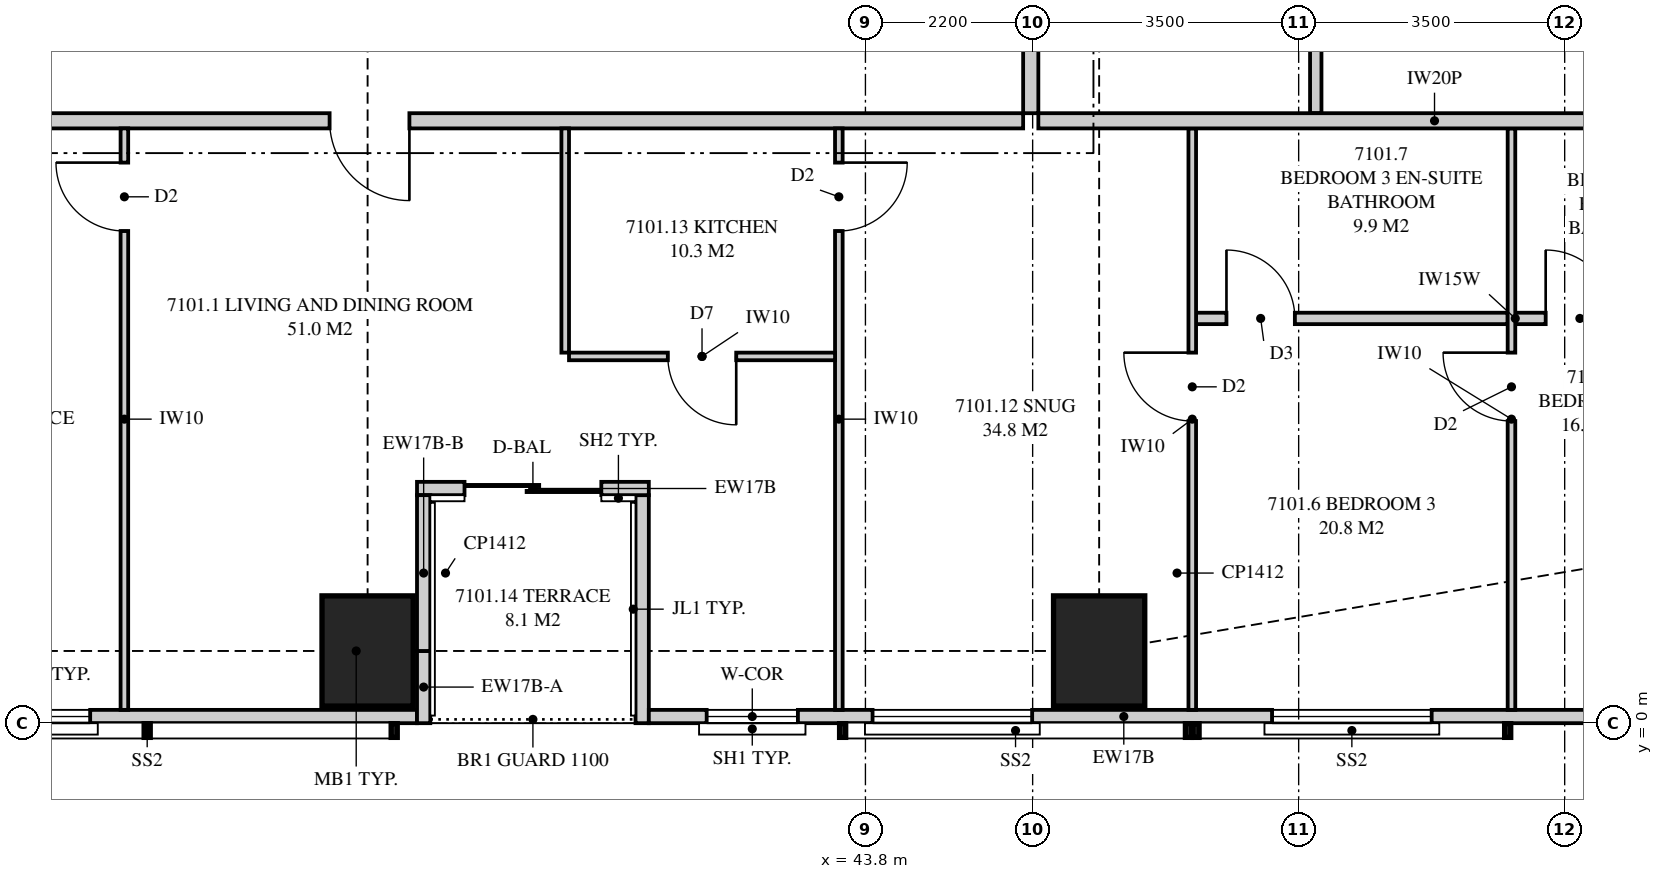
"""IFC4 building model, lengths in metres.
Left out: names, types, materials, properties, quantities, classifications, styles, units other than length and angle.
Written with IfcOpenShell. Run it as: python <this file> out.ifc"""

import sys

from ifc_helpers import new_model, si_unit, direction, frame, frame_2d, origin, origin_2d, place, context, subcontext, project, spatial, polyline, rectangle, outline, extrude, element, fill, save


model = new_model("IFC4")
c1 = context("Model", 3, precision=1e-05, world=origin(), true_north=direction((0.0, 1.0)))
c2 = subcontext(c1, "Body", "Model", "MODEL_VIEW")
j1 = project(units=[si_unit("LENGTHUNIT", "METRE"), si_unit("PLANEANGLEUNIT", "RADIAN")], contexts=[c1])
p1 = place(None, origin())
s1 = spatial("IfcSite", under=j1, at=p1, CompositionType="ELEMENT")
p2 = place(p1, origin())
s2 = spatial("IfcBuilding", under=s1, at=p2, CompositionType="ELEMENT")
p3 = place(p2, frame((0.0, 0.0, 259.95)))
s3 = spatial("IfcBuildingStorey", under=s2, at=p3, CompositionType="ELEMENT", Elevation=259.95)
for number, where, z_axis, x_axis in (
    (1, (37.25, 0.95, 0.0), (0.0, 0.0, 1.0), (0.0, 1.0, 0.0)),
    (2, (46.875, 0.95, 0.0), (0.0, 0.0, 1.0), (0.0, 1.0, 0.0)),
):
    element("IfcColumn", number, at=place(p3, frame(where, z_axis=z_axis, x_axis=x_axis)), inside=s3, PredefinedType="COLUMN", context=c2, shape_type="SweptSolid", body=[
        extrude(rectangle(XDim=1.45, YDim=1.2, at=origin_2d()), origin(), (0.0, 0.0, 1.0), 3.9),
    ])
p4 = place(p3, frame((19.851, 0.087, 0.0), z_axis=(0.0, 0.0, 1.0), x_axis=(1.0, 0.0, 0.0)))
e3 = element("IfcWall", 3, at=p4, inside=s3, PredefinedType="SOLIDWALL", context=c2, shape_type="SweptSolid", body=[
    extrude(outline(polyline([(0.0, 0.0), (18.049, 0.0), (18.049, 2.7), (7.774, 2.7), (7.774, 3.66), (7.642, 3.66), (7.642, 2.7), (7.559, 2.7), (7.559, 3.66), (0.0, 3.66), (0.0, 0.0)])), frame((0.0, 0.087, 0.0), z_axis=(0.0, -1.0, 0.0), x_axis=(1.0, 0.0, 0.0)), (0.0, 0.0, 1.0), 0.175),
])
p5 = place(p4, frame((3.399, 0.0, 0.4)))
e4 = element("IfcOpeningElement", 4, at=p5, cuts=e3, PredefinedType="OPENING", context=c2, shape_type="SweptSolid", body=[
    extrude(rectangle(XDim=2.1, YDim=2.25, at=frame_2d((1.05, 1.125))), frame((0.0, 0.097, 0.0), z_axis=(0.0, -1.0, 0.0), x_axis=(1.0, 0.0, 0.0)), (0.0, 0.0, 1.0), 0.195),
])
p6 = place(p4, frame((8.655, 0.0, 0.4)))
e5 = element("IfcOpeningElement", 5, at=p6, cuts=e3, PredefinedType="OPENING", context=c2, shape_type="SweptSolid", body=[
    extrude(rectangle(XDim=2.1, YDim=2.25, at=frame_2d((1.05, 1.125))), frame((0.0, 0.097, 0.0), z_axis=(0.0, -1.0, 0.0), x_axis=(1.0, 0.0, 0.0)), (0.0, 0.0, 1.0), 0.195),
])
p7 = place(p4, frame((11.649, 0.0, 0.4)))
e6 = element("IfcOpeningElement", 6, at=p7, cuts=e3, PredefinedType="OPENING", context=c2, shape_type="SweptSolid", body=[
    extrude(rectangle(XDim=2.1, YDim=2.25, at=frame_2d((1.05, 1.125))), frame((0.0, 0.097, 0.0), z_axis=(0.0, -1.0, 0.0), x_axis=(1.0, 0.0, 0.0)), (0.0, 0.0, 1.0), 0.195),
])
p8 = place(p3, frame((40.95, 0.087, 0.0), z_axis=(0.0, 0.0, 1.0), x_axis=(1.0, 0.0, 0.0)))
e7 = element("IfcWall", 7, at=p8, inside=s3, PredefinedType="SOLIDWALL", context=c2, shape_type="SweptSolid", body=[
    extrude(outline(polyline([(0.0, 0.0), (12.499, 0.0), (12.499, 3.66), (6.14, 3.66), (6.14, 2.7), (6.056, 2.7), (6.056, 3.66), (5.925, 3.66), (5.925, 2.7), (0.0, 2.7), (0.0, 0.0)])), frame((0.0, 0.087, 0.0), z_axis=(0.0, -1.0, 0.0), x_axis=(1.0, 0.0, 0.0)), (0.0, 0.0, 1.0), 0.175),
])
p9 = place(p8, frame((0.761, 0.0, 0.4)))
e8 = element("IfcOpeningElement", 8, at=p9, cuts=e7, PredefinedType="OPENING", context=c2, shape_type="SweptSolid", body=[
    extrude(rectangle(XDim=1.2, YDim=2.0, at=frame_2d((0.6, 1.0))), frame((0.0, 0.097, 0.0), z_axis=(0.0, -1.0, 0.0), x_axis=(1.0, 0.0, 0.0)), (0.0, 0.0, 1.0), 0.195),
])
p10 = place(p8, frame((2.944, 0.0, 0.4)))
e9 = element("IfcOpeningElement", 9, at=p10, cuts=e7, PredefinedType="OPENING", context=c2, shape_type="SweptSolid", body=[
    extrude(rectangle(XDim=2.1, YDim=2.25, at=frame_2d((1.05, 1.125))), frame((0.0, 0.097, 0.0), z_axis=(0.0, -1.0, 0.0), x_axis=(1.0, 0.0, 0.0)), (0.0, 0.0, 1.0), 0.195),
])
p11 = place(p8, frame((8.2, 0.0, 0.4)))
e10 = element("IfcOpeningElement", 10, at=p11, cuts=e7, PredefinedType="OPENING", context=c2, shape_type="SweptSolid", body=[
    extrude(rectangle(XDim=2.1, YDim=2.25, at=frame_2d((1.05, 1.125))), frame((0.0, 0.097, 0.0), z_axis=(0.0, -1.0, 0.0), x_axis=(1.0, 0.0, 0.0)), (0.0, 0.0, 1.0), 0.195),
])
p12 = place(p3, frame((37.9, 3.087, 0.0), z_axis=(0.0, 0.0, 1.0), x_axis=(1.0, 0.0, 0.0)))
e11 = element("IfcWall", 11, at=p12, inside=s3, PredefinedType="SOLIDWALL", context=c2, shape_type="SweptSolid", body=[
    extrude(outline(polyline([(0.0, 0.0), (3.05, 0.0), (3.05, 3.66), (0.55, 3.66), (0.55, 3.06), (0.0, 3.06), (0.0, 0.0)])), frame((0.0, 0.087, 0.0), z_axis=(0.0, -1.0, 0.0), x_axis=(1.0, 0.0, 0.0)), (0.0, 0.0, 1.0), 0.175),
])
p13 = place(p12, frame((0.625, 0.0, 0.0)))
e12 = element("IfcOpeningElement", 12, at=p13, cuts=e11, PredefinedType="OPENING", context=c2, shape_type="SweptSolid", body=[
    extrude(rectangle(XDim=1.8, YDim=2.4, at=frame_2d((0.9, 1.2))), frame((0.0, 0.097, 0.0), z_axis=(0.0, -1.0, 0.0), x_axis=(1.0, 0.0, 0.0)), (0.0, 0.0, 1.0), 0.195),
])
p14 = place(p3, frame((37.988, 0.0, 0.0), z_axis=(0.0, 0.0, 1.0), x_axis=(0.0, 1.0, 0.0)))
e13 = element("IfcWall", 13, at=p14, inside=s3, PredefinedType="SOLIDWALL", context=c2, shape_type="SweptSolid", body=[
    extrude(outline(polyline([(0.0, 0.0), (0.95, 0.0), (0.95, 2.7), (0.15, 2.7), (0.15, 3.66), (0.0, 3.66), (0.0, 0.0)])), frame((0.0, 0.087, 0.0), z_axis=(0.0, -1.0, 0.0), x_axis=(1.0, 0.0, 0.0)), (0.0, 0.0, 1.0), 0.175),
])
p15 = place(p3, frame((37.988, 0.95, 0.0), z_axis=(0.0, 0.0, 1.0), x_axis=(0.0, 1.0, 0.0)))
e14 = element("IfcWall", 14, at=p15, inside=s3, PredefinedType="SOLIDWALL", context=c2, shape_type="SweptSolid", body=[
    extrude(outline(polyline([(0.0, 0.0), (2.05, 0.0), (2.05, 3.06), (0.8, 3.06), (0.8, 2.7), (0.0, 2.7), (0.0, 0.0)])), frame((0.0, 0.087, 0.0), z_axis=(0.0, -1.0, 0.0), x_axis=(1.0, 0.0, 0.0)), (0.0, 0.0, 1.0), 0.175),
])
p16 = place(p3, frame((40.863, 0.0, 0.0), z_axis=(0.0, 0.0, 1.0), x_axis=(0.0, 1.0, 0.0)))
e15 = element("IfcWall", 15, at=p16, inside=s3, PredefinedType="SOLIDWALL", context=c2, shape_type="SweptSolid", body=[
    extrude(outline(polyline([(0.0, 0.0), (3.0, 0.0), (3.0, 3.66), (1.75, 3.66), (1.75, 2.7), (0.15, 2.7), (0.15, 3.66), (0.0, 3.66), (0.0, 0.0)])), frame((0.0, 0.087, 0.0), z_axis=(0.0, -1.0, 0.0), x_axis=(1.0, 0.0, 0.0)), (0.0, 0.0, 1.0), 0.175),
])
p17 = place(p3, frame((18.0, 7.925, 0.0), z_axis=(0.0, 0.0, 1.0), x_axis=(1.0, 0.0, 0.0)))
e16 = element("IfcWall", 16, at=p17, inside=s3, PredefinedType="PARTITIONING", context=c2, shape_type="SweptSolid", body=[
    extrude(outline(polyline([(0.0, 0.0), (27.875, 0.0), (27.875, 3.66), (27.875, 3.06), (27.565, 3.06), (27.565, 3.66), (20.56, 3.66), (20.56, 3.06), (17.94, 3.06), (17.94, 3.66), (10.935, 3.66), (10.935, 3.06), (8.315, 3.06), (8.315, 3.66), (1.839, 3.66), (1.839, 2.7), (0.0, 2.7), (0.0, 3.66), (0.0, 0.0)])), frame((0.0, 0.1, 0.0), z_axis=(0.0, -1.0, 0.0), x_axis=(1.0, 0.0, 0.0)), (0.0, 0.0, 1.0), 0.2),
])
p18 = place(p17, frame((18.75, 0.0, 0.0)))
e17 = element("IfcOpeningElement", 17, at=p18, cuts=e16, PredefinedType="OPENING", context=c2, shape_type="SweptSolid", body=[
    extrude(rectangle(XDim=1.05, YDim=2.2, at=frame_2d((0.525, 1.1))), frame((0.0, 0.11, 0.0), z_axis=(0.0, -1.0, 0.0), x_axis=(1.0, 0.0, 0.0)), (0.0, 0.0, 1.0), 0.22),
])
p19 = place(p3, frame((48.1, 0.175, 0.0), z_axis=(0.0, 0.0, 1.0), x_axis=(0.0, 1.0, 0.0)))
e18 = element("IfcWall", 18, at=p19, inside=s3, PredefinedType="PARTITIONING", context=c2, shape_type="SweptSolid", body=[
    extrude(outline(polyline([(0.0, 0.0), (7.65, 0.0), (7.65, 3.66), (7.65, 3.06), (1.855, 3.06), (1.855, 2.7), (0.11, 2.7), (0.11, 3.66), (0.0, 3.66), (0.0, 0.0)])), frame((0.0, 0.05, 0.0), z_axis=(0.0, -1.0, 0.0), x_axis=(1.0, 0.0, 0.0)), (0.0, 0.0, 1.0), 0.1),
])
p20 = place(p19, frame((3.8, 0.0, 0.0)))
e19 = element("IfcOpeningElement", 19, at=p20, cuts=e18, PredefinedType="OPENING", context=c2, shape_type="SweptSolid", body=[
    extrude(rectangle(XDim=0.9, YDim=2.1, at=frame_2d((0.45, 1.05))), frame((0.0, 0.06, 0.0), z_axis=(0.0, -1.0, 0.0), x_axis=(1.0, 0.0, 0.0)), (0.0, 0.0, 1.0), 0.12),
])
p21 = place(p3, frame((52.3, 0.175, 0.0), z_axis=(0.0, 0.0, 1.0), x_axis=(0.0, 1.0, 0.0)))
e20 = element("IfcWall", 20, at=p21, inside=s3, PredefinedType="PARTITIONING", context=c2, shape_type="SweptSolid", body=[
    extrude(outline(polyline([(0.0, 0.0), (7.65, 0.0), (7.65, 3.66), (2.567, 3.66), (2.567, 2.7), (0.822, 2.7), (0.822, 3.66), (0.0, 3.66), (0.0, 0.0)])), frame((0.0, 0.05, 0.0), z_axis=(0.0, -1.0, 0.0), x_axis=(1.0, 0.0, 0.0)), (0.0, 0.0, 1.0), 0.1),
])
p22 = place(p21, frame((3.8, 0.0, 0.0)))
e21 = element("IfcOpeningElement", 21, at=p22, cuts=e20, PredefinedType="OPENING", context=c2, shape_type="SweptSolid", body=[
    extrude(rectangle(XDim=0.9, YDim=2.1, at=frame_2d((0.45, 1.05))), frame((0.0, 0.06, 0.0), z_axis=(0.0, -1.0, 0.0), x_axis=(1.0, 0.0, 0.0)), (0.0, 0.0, 1.0), 0.12),
])
p23 = place(p3, frame((48.15, 5.325, 0.0), z_axis=(0.0, 0.0, 1.0), x_axis=(1.0, 0.0, 0.0)))
e22 = element("IfcWall", 22, at=p23, inside=s3, PredefinedType="PLUMBINGWALL", context=c2, shape_type="SweptSolid", body=[
    extrude(outline(polyline([(0.0, 0.0), (4.1, 0.0), (4.1, 3.66), (0.01, 3.66), (0.01, 3.06), (0.0, 3.06), (0.0, 3.66), (0.0, 0.0)])), frame((0.0, 0.075, 0.0), z_axis=(0.0, -1.0, 0.0), x_axis=(1.0, 0.0, 0.0)), (0.0, 0.0, 1.0), 0.15),
])
p24 = place(p23, frame((0.4, 0.0, 0.0)))
e23 = element("IfcOpeningElement", 23, at=p24, cuts=e22, PredefinedType="OPENING", context=c2, shape_type="SweptSolid", body=[
    extrude(rectangle(XDim=0.9, YDim=2.1, at=frame_2d((0.45, 1.05))), frame((0.0, 0.085, 0.0), z_axis=(0.0, -1.0, 0.0), x_axis=(1.0, 0.0, 0.0)), (0.0, 0.0, 1.0), 0.17),
])
p25 = place(p3, frame((52.35, 5.325, 0.0), z_axis=(0.0, 0.0, 1.0), x_axis=(1.0, 0.0, 0.0)))
e24 = element("IfcWall", 24, at=p25, inside=s3, PredefinedType="PLUMBINGWALL", context=c2, shape_type="SweptSolid", body=[
    extrude(outline(polyline([(0.0, 0.0), (4.15, 0.0), (4.15, 3.66), (3.197, 3.66), (3.197, 2.7), (1.415, 2.7), (1.415, 3.66), (0.0, 3.66), (0.0, 0.0)])), frame((0.0, 0.075, 0.0), z_axis=(0.0, -1.0, 0.0), x_axis=(1.0, 0.0, 0.0)), (0.0, 0.0, 1.0), 0.15),
])
p26 = place(p25, frame((0.4, 0.0, 0.0)))
e25 = element("IfcOpeningElement", 25, at=p26, cuts=e24, PredefinedType="OPENING", context=c2, shape_type="SweptSolid", body=[
    extrude(rectangle(XDim=0.9, YDim=2.1, at=frame_2d((0.45, 1.05))), frame((0.0, 0.085, 0.0), z_axis=(0.0, -1.0, 0.0), x_axis=(1.0, 0.0, 0.0)), (0.0, 0.0, 1.0), 0.17),
])
p27 = place(p3, frame((34.05, 0.175, 0.0), z_axis=(0.0, 0.0, 1.0), x_axis=(0.0, 1.0, 0.0)))
e26 = element("IfcWall", 26, at=p27, inside=s3, PredefinedType="PARTITIONING", context=c2, shape_type="SweptSolid", body=[
    extrude(outline(polyline([(0.0, 0.0), (7.65, 0.0), (7.65, 3.66), (1.635, 3.66), (1.635, 2.7), (0.0, 2.7), (0.0, 3.66), (0.0, 0.0)])), frame((0.0, 0.05, 0.0), z_axis=(0.0, -1.0, 0.0), x_axis=(1.0, 0.0, 0.0)), (0.0, 0.0, 1.0), 0.1),
])
p28 = place(p27, frame((6.3, 0.0, 0.0)))
e27 = element("IfcOpeningElement", 27, at=p28, cuts=e26, PredefinedType="OPENING", context=c2, shape_type="SweptSolid", body=[
    extrude(rectangle(XDim=0.9, YDim=2.1, at=frame_2d((0.45, 1.05))), frame((0.0, 0.06, 0.0), z_axis=(0.0, -1.0, 0.0), x_axis=(1.0, 0.0, 0.0)), (0.0, 0.0, 1.0), 0.12),
])
p29 = place(p3, frame((43.45, 0.175, 0.0), z_axis=(0.0, 0.0, 1.0), x_axis=(0.0, 1.0, 0.0)))
e28 = element("IfcWall", 28, at=p29, inside=s3, PredefinedType="PARTITIONING", context=c2, shape_type="SweptSolid", body=[
    extrude(outline(polyline([(0.0, 0.0), (7.65, 0.0), (7.65, 3.66), (1.635, 3.66), (1.635, 2.7), (0.0, 2.7), (0.0, 3.66), (0.0, 0.0)])), frame((0.0, 0.05, 0.0), z_axis=(0.0, -1.0, 0.0), x_axis=(1.0, 0.0, 0.0)), (0.0, 0.0, 1.0), 0.1),
])
p30 = place(p29, frame((6.3, 0.0, 0.0)))
e29 = element("IfcOpeningElement", 29, at=p30, cuts=e28, PredefinedType="OPENING", context=c2, shape_type="SweptSolid", body=[
    extrude(rectangle(XDim=0.9, YDim=2.1, at=frame_2d((0.45, 1.05))), frame((0.0, 0.06, 0.0), z_axis=(0.0, -1.0, 0.0), x_axis=(1.0, 0.0, 0.0)), (0.0, 0.0, 1.0), 0.12),
])
p31 = place(p3, frame((39.9, 4.825, 0.0), z_axis=(0.0, 0.0, 1.0), x_axis=(1.0, 0.0, 0.0)))
e30 = element("IfcWall", 30, at=p31, inside=s3, PredefinedType="PARTITIONING", context=c2, shape_type="SweptSolid", body=[
    extrude(rectangle(XDim=3.5, YDim=0.1, at=frame_2d((1.75, 0.0))), origin(), (0.0, 0.0, 1.0), 3.66),
])
p32 = place(p31, frame((1.3, 0.0, 0.0)))
e31 = element("IfcOpeningElement", 31, at=p32, cuts=e30, PredefinedType="OPENING", context=c2, shape_type="SweptSolid", body=[
    extrude(rectangle(XDim=0.9, YDim=2.1, at=frame_2d((0.45, 1.05))), frame((0.0, 0.06, 0.0), z_axis=(0.0, -1.0, 0.0), x_axis=(1.0, 0.0, 0.0)), (0.0, 0.0, 1.0), 0.12),
])
p33 = place(p3, frame((39.85, 4.875, 0.0), z_axis=(0.0, 0.0, 1.0), x_axis=(0.0, 1.0, 0.0)))
e32 = element("IfcWall", 32, at=p33, inside=s3, PredefinedType="PARTITIONING", context=c2, shape_type="SweptSolid", body=[
    extrude(rectangle(XDim=2.95, YDim=0.1, at=frame_2d((1.475, 0.0))), origin(), (0.0, 0.0, 1.0), 3.66),
])
p34 = place(p3, frame((46.075, 7.925, 0.0), z_axis=(0.0, 0.0, 1.0), x_axis=(1.0, 0.0, 0.0)))
e33 = element("IfcWall", 33, at=p34, inside=s3, PredefinedType="PARTITIONING", context=c2, shape_type="SweptSolid", body=[
    extrude(outline(polyline([(0.0, 0.0), (10.425, 0.0), (10.425, 3.66), (9.8, 3.66), (9.8, 2.7), (7.968, 2.7), (7.968, 3.66), (2.11, 3.66), (2.11, 3.06), (0.0, 3.06), (0.0, 3.66), (0.0, 0.0)])), frame((0.0, 0.1, 0.0), z_axis=(0.0, -1.0, 0.0), x_axis=(1.0, 0.0, 0.0)), (0.0, 0.0, 1.0), 0.2),
])
p35 = place(p3, frame((45.975, 8.025, 0.0), z_axis=(0.0, 0.0, 1.0), x_axis=(0.0, 1.0, 0.0)))
e34 = element("IfcWall", 34, at=p35, inside=s3, PredefinedType="PARTITIONING", context=c2, shape_type="SweptSolid", body=[
    extrude(rectangle(XDim=4.975, YDim=0.2, at=frame_2d((2.488, 0.0))), origin(), (0.0, 0.0, 1.0), 3.06),
])
p36 = place(p3, frame((49.725, 8.025, 0.0), z_axis=(0.0, 0.0, 1.0), x_axis=(0.0, 1.0, 0.0)))
e35 = element("IfcWall", 35, at=p36, inside=s3, PredefinedType="PLUMBINGWALL", context=c2, shape_type="SweptSolid", body=[
    extrude(outline(polyline([(0.0, 0.0), (4.05, 0.0), (4.05, 3.66), (4.05, 3.06), (3.69, 3.06), (3.69, 3.66), (0.0, 3.66), (0.0, 0.0)])), frame((0.0, 0.075, 0.0), z_axis=(0.0, -1.0, 0.0), x_axis=(1.0, 0.0, 0.0)), (0.0, 0.0, 1.0), 0.15),
])
p37 = place(p36, frame((2.75, 0.0, 0.0)))
e36 = element("IfcOpeningElement", 36, at=p37, cuts=e35, PredefinedType="OPENING", context=c2, shape_type="SweptSolid", body=[
    extrude(rectangle(XDim=0.9, YDim=2.1, at=frame_2d((0.45, 1.05))), frame((0.0, 0.085, 0.0), z_axis=(0.0, -1.0, 0.0), x_axis=(1.0, 0.0, 0.0)), (0.0, 0.0, 1.0), 0.17),
])
p38 = place(p7, origin())
e37 = element("IfcWindow", 37, at=p38, inside=s3, PartitioningType="SINGLE_PANEL", PredefinedType="WINDOW", context=c2, shape_type="SweptSolid", body=[
    extrude(rectangle(XDim=2.1, YDim=2.25, at=frame_2d((1.05, 1.125))), frame((0.0, 0.03, 0.0), z_axis=(0.0, -1.0, 0.0), x_axis=(1.0, 0.0, 0.0)), (0.0, 0.0, 1.0), 0.06),
])
fill(e6, e37)
p39 = place(p13, origin())
e38 = element("IfcDoor", 38, at=p39, inside=s3, OperationType="SLIDING_TO_LEFT", PredefinedType="DOOR", context=c2, shape_type="SweptSolid", body=[
    extrude(rectangle(XDim=1.8, YDim=2.4, at=frame_2d((0.9, 1.2))), frame((0.0, 0.025, 0.0), z_axis=(0.0, -1.0, 0.0), x_axis=(1.0, 0.0, 0.0)), (0.0, 0.0, 1.0), 0.05),
])
fill(e12, e38)
p40 = place(p9, origin())
e39 = element("IfcWindow", 39, at=p40, inside=s3, PartitioningType="SINGLE_PANEL", PredefinedType="WINDOW", context=c2, shape_type="SweptSolid", body=[
    extrude(rectangle(XDim=1.2, YDim=2.0, at=frame_2d((0.6, 1.0))), frame((0.0, 0.03, 0.0), z_axis=(0.0, -1.0, 0.0), x_axis=(1.0, 0.0, 0.0)), (0.0, 0.0, 1.0), 0.06),
])
fill(e8, e39)
p41 = place(p10, origin())
e40 = element("IfcWindow", 40, at=p41, inside=s3, PartitioningType="SINGLE_PANEL", PredefinedType="WINDOW", context=c2, shape_type="SweptSolid", body=[
    extrude(rectangle(XDim=2.1, YDim=2.25, at=frame_2d((1.05, 1.125))), frame((0.0, 0.03, 0.0), z_axis=(0.0, -1.0, 0.0), x_axis=(1.0, 0.0, 0.0)), (0.0, 0.0, 1.0), 0.06),
])
fill(e9, e40)
p42 = place(p11, origin())
e41 = element("IfcWindow", 41, at=p42, inside=s3, PartitioningType="SINGLE_PANEL", PredefinedType="WINDOW", context=c2, shape_type="SweptSolid", body=[
    extrude(rectangle(XDim=2.1, YDim=2.25, at=frame_2d((1.05, 1.125))), frame((0.0, 0.03, 0.0), z_axis=(0.0, -1.0, 0.0), x_axis=(1.0, 0.0, 0.0)), (0.0, 0.0, 1.0), 0.06),
])
fill(e10, e41)
p43 = place(p18, frame((1.05, 0.0, 0.0), z_axis=(0.0, 0.0, 1.0), x_axis=(-1.0, 0.0, 0.0)))
e42 = element("IfcDoor", 42, at=p43, inside=s3, OperationType="SINGLE_SWING_LEFT", PredefinedType="DOOR", context=c2, shape_type="SweptSolid", body=[
    extrude(rectangle(XDim=1.05, YDim=2.2, at=frame_2d((0.525, 1.1))), frame((0.0, 0.025, 0.0), z_axis=(0.0, -1.0, 0.0), x_axis=(1.0, 0.0, 0.0)), (0.0, 0.0, 1.0), 0.05),
])
fill(e17, e42)
p44 = place(p20, origin())
e43 = element("IfcDoor", 43, at=p44, inside=s3, OperationType="SINGLE_SWING_RIGHT", PredefinedType="DOOR", context=c2, shape_type="SweptSolid", body=[
    extrude(rectangle(XDim=0.9, YDim=2.1, at=frame_2d((0.45, 1.05))), frame((0.0, 0.025, 0.0), z_axis=(0.0, -1.0, 0.0), x_axis=(1.0, 0.0, 0.0)), (0.0, 0.0, 1.0), 0.05),
])
fill(e19, e43)
p45 = place(p24, origin())
e44 = element("IfcDoor", 44, at=p45, inside=s3, OperationType="SINGLE_SWING_LEFT", PredefinedType="DOOR", context=c2, shape_type="SweptSolid", body=[
    extrude(rectangle(XDim=0.9, YDim=2.1, at=frame_2d((0.45, 1.05))), frame((0.0, 0.025, 0.0), z_axis=(0.0, -1.0, 0.0), x_axis=(1.0, 0.0, 0.0)), (0.0, 0.0, 1.0), 0.05),
])
fill(e23, e44)
p46 = place(p22, origin())
e45 = element("IfcDoor", 45, at=p46, inside=s3, OperationType="SINGLE_SWING_RIGHT", PredefinedType="DOOR", context=c2, shape_type="SweptSolid", body=[
    extrude(rectangle(XDim=0.9, YDim=2.1, at=frame_2d((0.45, 1.05))), frame((0.0, 0.025, 0.0), z_axis=(0.0, -1.0, 0.0), x_axis=(1.0, 0.0, 0.0)), (0.0, 0.0, 1.0), 0.05),
])
fill(e21, e45)
p47 = place(p26, origin())
e46 = element("IfcDoor", 46, at=p47, inside=s3, OperationType="SINGLE_SWING_LEFT", PredefinedType="DOOR", context=c2, shape_type="SweptSolid", body=[
    extrude(rectangle(XDim=0.9, YDim=2.1, at=frame_2d((0.45, 1.05))), frame((0.0, 0.025, 0.0), z_axis=(0.0, -1.0, 0.0), x_axis=(1.0, 0.0, 0.0)), (0.0, 0.0, 1.0), 0.05),
])
fill(e25, e46)
p48 = place(p28, origin())
e47 = element("IfcDoor", 47, at=p48, inside=s3, OperationType="SINGLE_SWING_RIGHT", PredefinedType="DOOR", context=c2, shape_type="SweptSolid", body=[
    extrude(rectangle(XDim=0.9, YDim=2.1, at=frame_2d((0.45, 1.05))), frame((0.0, 0.025, 0.0), z_axis=(0.0, -1.0, 0.0), x_axis=(1.0, 0.0, 0.0)), (0.0, 0.0, 1.0), 0.05),
])
fill(e27, e47)
p49 = place(p30, frame((0.9, 0.0, 0.0), z_axis=(0.0, 0.0, 1.0), x_axis=(-1.0, 0.0, 0.0)))
e48 = element("IfcDoor", 48, at=p49, inside=s3, OperationType="SINGLE_SWING_LEFT", PredefinedType="DOOR", context=c2, shape_type="SweptSolid", body=[
    extrude(rectangle(XDim=0.9, YDim=2.1, at=frame_2d((0.45, 1.05))), frame((0.0, 0.025, 0.0), z_axis=(0.0, -1.0, 0.0), x_axis=(1.0, 0.0, 0.0)), (0.0, 0.0, 1.0), 0.05),
])
fill(e29, e48)
p50 = place(p32, frame((0.9, 0.0, 0.0), z_axis=(0.0, 0.0, 1.0), x_axis=(-1.0, 0.0, 0.0)))
e49 = element("IfcDoor", 49, at=p50, inside=s3, OperationType="SINGLE_SWING_LEFT", PredefinedType="DOOR", context=c2, shape_type="SweptSolid", body=[
    extrude(rectangle(XDim=0.9, YDim=2.1, at=frame_2d((0.45, 1.05))), frame((0.0, 0.025, 0.0), z_axis=(0.0, -1.0, 0.0), x_axis=(1.0, 0.0, 0.0)), (0.0, 0.0, 1.0), 0.05),
])
fill(e31, e49)
save(model, sys.argv[1])
